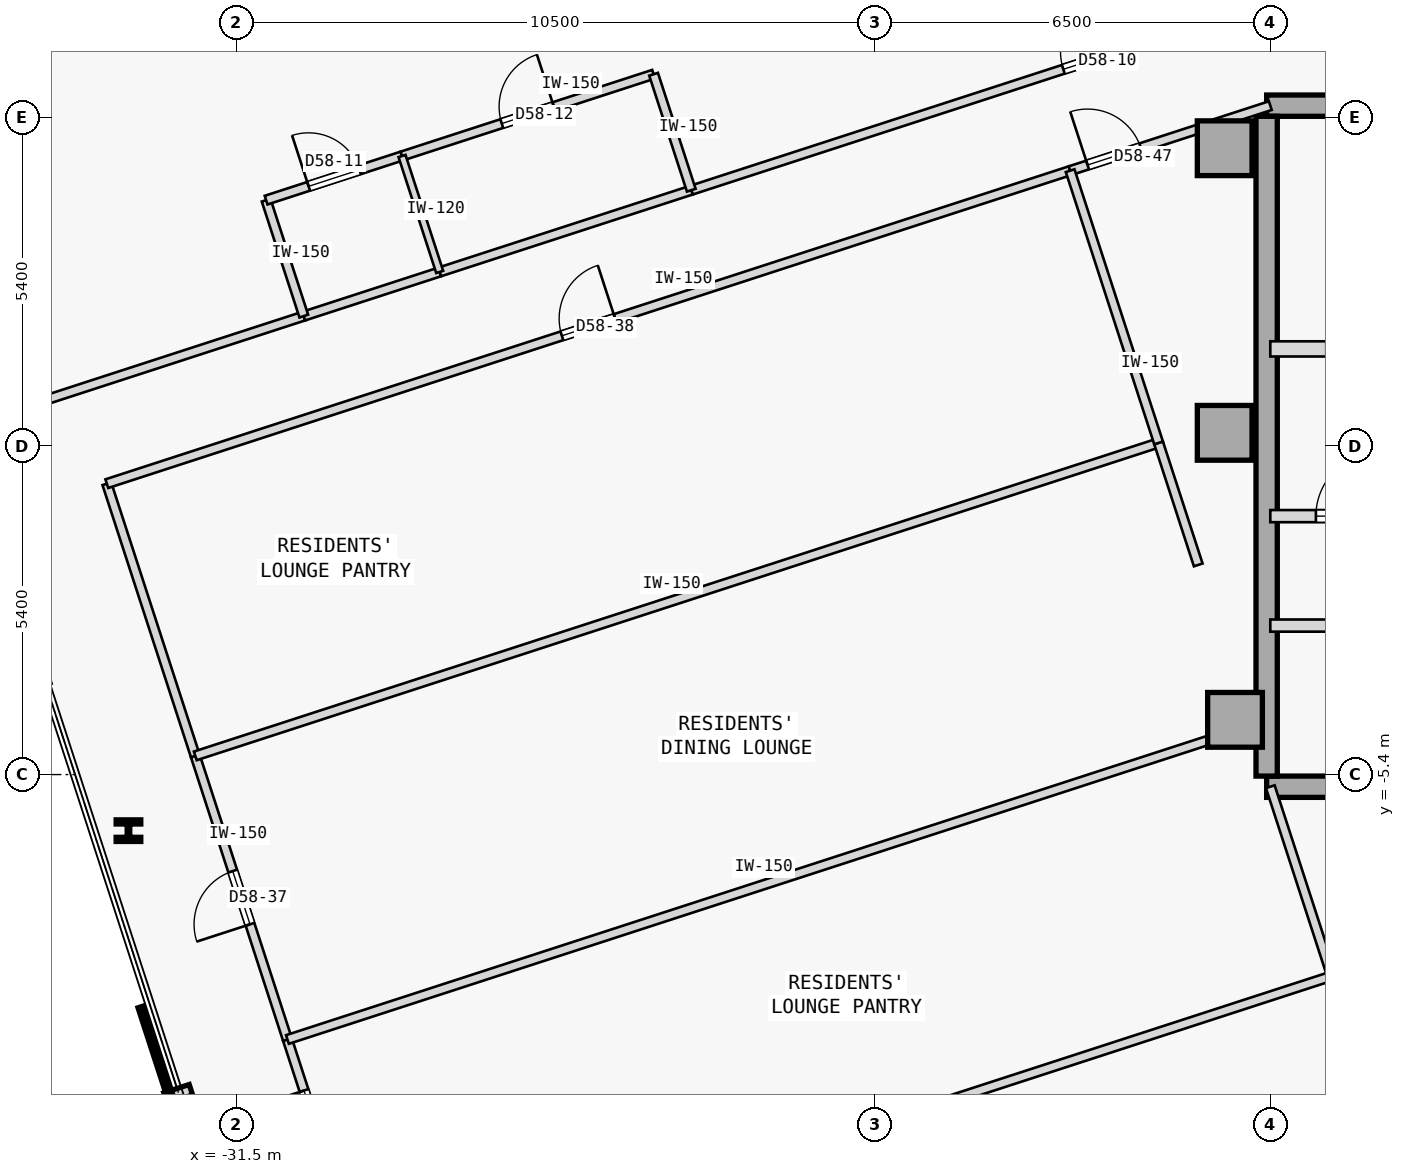
"""IFC4 building model, lengths in metres.
Left out: names, types, materials, properties, quantities, classifications, styles, units other than length and angle.
Written with IfcOpenShell. Run it as: python <this file> out.ifc"""

import sys

from ifc_helpers import new_model, si_unit, direction, frame, frame_2d, origin, origin_2d, place, context, subcontext, project, spatial, rectangle, i_section, extrude, element, fill, save


model = new_model("IFC4")
c1 = context("Model", 3, precision=1e-05, world=origin(), true_north=direction((0.0, 1.0)))
c2 = subcontext(c1, "Body", "Model", "MODEL_VIEW")
j1 = project(units=[si_unit("LENGTHUNIT", "METRE"), si_unit("PLANEANGLEUNIT", "RADIAN")], contexts=[c1])
p1 = place(None, origin())
s1 = spatial("IfcSite", under=j1, at=p1, CompositionType="ELEMENT")
p2 = place(p1, origin())
s2 = spatial("IfcBuilding", under=s1, at=p2, CompositionType="ELEMENT")
p3 = place(p2, frame((0.0, 0.0, 220.95)))
s3 = spatial("IfcBuildingStorey", under=s2, at=p3, CompositionType="ELEMENT", Elevation=220.95)
for number, where, z_axis, x_axis in (
    (1, (-15.25, 4.9, 0.0), (0.0, 0.0, 1.0), (1.0, 0.0, 0.0)),
    (2, (-15.25, 0.22, 0.0), (0.0, 0.0, 1.0), (1.0, 0.0, 0.0)),
    (3, (-15.08, -4.5, 0.0), (0.0, 0.0, 1.0), (1.0, 0.0, 0.0)),
):
    element("IfcColumn", number, at=place(p3, frame(where, z_axis=z_axis, x_axis=x_axis)), inside=s3, PredefinedType="COLUMN", context=c2, shape_type="SweptSolid", body=[
        extrude(rectangle(XDim=0.9, YDim=0.9, at=origin_2d()), origin(), (0.0, 0.0, 1.0), 3.35),
    ])
p4 = place(p3, frame((-14.56, 5.6, 0.0), z_axis=(0.0, 0.0, 1.0), x_axis=(1.0, 0.0, 0.0)))
e4 = element("IfcWall", 4, at=p4, inside=s3, PredefinedType="SHEAR", context=c2, shape_type="SweptSolid", body=[
    extrude(rectangle(XDim=11.41, YDim=0.35, at=frame_2d((5.705, 0.0))), origin(), (0.0, 0.0, 1.0), 3.125),
])
p5 = place(p3, frame((-14.56, -5.6, 0.0), z_axis=(0.0, 0.0, 1.0), x_axis=(1.0, 0.0, 0.0)))
e5 = element("IfcWall", 5, at=p5, inside=s3, PredefinedType="SHEAR", context=c2, shape_type="SweptSolid", body=[
    extrude(rectangle(XDim=10.86, YDim=0.35, at=frame_2d((5.43, 0.0))), origin(), (0.0, 0.0, 1.0), 3.125),
])
p6 = place(p3, frame((-14.56, -5.425, 0.0), z_axis=(0.0, 0.0, 1.0), x_axis=(0.0, 1.0, 0.0)))
e6 = element("IfcWall", 6, at=p6, inside=s3, PredefinedType="SHEAR", context=c2, shape_type="SweptSolid", body=[
    extrude(rectangle(XDim=10.85, YDim=0.35, at=frame_2d((5.425, 0.0))), origin(), (0.0, 0.0, 1.0), 3.125),
])
p7 = place(p3, frame((-33.278, -6.322, 0.0), z_axis=(0.0, 0.0, 1.0), x_axis=(1.0, 0.0, 0.0)))
e7 = element("IfcColumn", 7, at=p7, inside=s3, PredefinedType="COLUMN", context=c2, shape_type="SweptSolid", body=[
    extrude(i_section(OverallWidth=0.405, OverallDepth=0.355, WebThickness=0.042, FlangeThickness=0.068, FilletRadius=0.015, at=origin_2d()), origin(), (0.0, 0.0, 1.0), 3.35),
])
p8 = place(p3, frame((-14.5, 1.6, 0.0), z_axis=(0.0, 0.0, 1.0), x_axis=(1.0, 0.0, 0.0)))
e8 = element("IfcWall", 8, at=p8, inside=s3, PredefinedType="STANDARD", context=c2, shape_type="SweptSolid", body=[
    extrude(rectangle(XDim=3.6, YDim=0.25, at=frame_2d((1.8, 0.0))), origin(), (0.0, 0.0, 1.0), 3.125),
])
p9 = place(p8, frame((0.92, 0.0, 0.0)))
e9 = element("IfcOpeningElement", 9, at=p9, cuts=e8, PredefinedType="OPENING", context=c2, shape_type="SweptSolid", body=[
    extrude(rectangle(XDim=1.05, YDim=2.15, at=frame_2d((0.525, 1.075))), frame((0.0, 0.135, 0.0), z_axis=(0.0, -1.0, 0.0), x_axis=(1.0, 0.0, 0.0)), (0.0, 0.0, 1.0), 0.27),
])
p10 = place(p3, frame((-14.5, -1.15, 0.0), z_axis=(0.0, 0.0, 1.0), x_axis=(1.0, 0.0, 0.0)))
e10 = element("IfcWall", 10, at=p10, inside=s3, PredefinedType="STANDARD", context=c2, shape_type="SweptSolid", body=[
    extrude(rectangle(XDim=2.95, YDim=0.2, at=frame_2d((1.475, 0.0))), origin(), (0.0, 0.0, 1.0), 3.125),
])
p11 = place(p10, frame((0.75, 0.0, 0.0)))
e11 = element("IfcOpeningElement", 11, at=p11, cuts=e10, PredefinedType="OPENING", context=c2, shape_type="SweptSolid", body=[
    extrude(rectangle(XDim=1.05, YDim=2.18, at=frame_2d((0.525, 1.09))), frame((0.0, 0.11, 0.0), z_axis=(0.0, -1.0, 0.0), x_axis=(1.0, 0.0, 0.0)), (0.0, 0.0, 1.0), 0.22),
])
p12 = place(p3, frame((-14.5, -2.95, 0.0), z_axis=(0.0, 0.0, 1.0), x_axis=(1.0, 0.0, 0.0)))
e12 = element("IfcWall", 12, at=p12, inside=s3, PredefinedType="STANDARD", context=c2, shape_type="SweptSolid", body=[
    extrude(rectangle(XDim=10.8, YDim=0.2, at=frame_2d((5.4, 0.0))), origin(), (0.0, 0.0, 1.0), 3.125),
])
p13 = place(p12, frame((9.17, 0.0, 0.0)))
e13 = element("IfcOpeningElement", 13, at=p13, cuts=e12, PredefinedType="OPENING", context=c2, shape_type="SweptSolid", body=[
    extrude(rectangle(XDim=1.1, YDim=2.15, at=frame_2d((0.55, 1.075))), frame((0.0, 0.11, 0.0), z_axis=(0.0, -1.0, 0.0), x_axis=(1.0, 0.0, 0.0)), (0.0, 0.0, 1.0), 0.22),
])
p14 = place(p12, frame((1.73, 0.0, 0.0)))
e14 = element("IfcOpeningElement", 14, at=p14, cuts=e12, PredefinedType="OPENING", context=c2, shape_type="SweptSolid", body=[
    extrude(rectangle(XDim=0.92, YDim=2.15, at=frame_2d((0.46, 1.075))), frame((0.0, 0.11, 0.0), z_axis=(0.0, -1.0, 0.0), x_axis=(1.0, 0.0, 0.0)), (0.0, 0.0, 1.0), 0.22),
])
p15 = place(p12, frame((6.05, 0.0, 0.0)))
e15 = element("IfcOpeningElement", 15, at=p15, cuts=e12, PredefinedType="OPENING", context=c2, shape_type="SweptSolid", body=[
    extrude(rectangle(XDim=0.92, YDim=2.15, at=frame_2d((0.46, 1.075))), frame((0.0, 0.11, 0.0), z_axis=(0.0, -1.0, 0.0), x_axis=(1.0, 0.0, 0.0)), (0.0, 0.0, 1.0), 0.22),
])
p16 = place(p3, frame((-36.012, 0.314, 0.0), z_axis=(0.0, 0.0, 1.0), x_axis=(0.951065348244, 0.308989811111, 0.0)))
e16 = element("IfcWall", 16, at=p16, inside=s3, PredefinedType="PARTITIONING", context=c2, shape_type="SweptSolid", body=[
    extrude(rectangle(XDim=5.907, YDim=0.15, at=frame_2d((2.954, 0.0))), origin(), (0.0, 0.0, 1.0), 3.125),
])
p17 = place(p3, frame((-24.022, 4.21, 0.0), z_axis=(0.0, 0.0, 1.0), x_axis=(0.951058997127, 0.309009359055, 0.0)))
e17 = element("IfcWall", 17, at=p17, inside=s3, PredefinedType="PARTITIONING", context=c2, shape_type="SweptSolid", body=[
    extrude(rectangle(XDim=13.817, YDim=0.15, at=frame_2d((6.908, 0.0))), origin(), (0.0, 0.0, 1.0), 3.125),
])
p18 = place(p17, frame((6.434, 0.0, 0.0)))
e18 = element("IfcOpeningElement", 18, at=p18, cuts=e17, PredefinedType="OPENING", context=c2, shape_type="SweptSolid", body=[
    extrude(rectangle(XDim=0.95, YDim=2.15, at=frame_2d((0.475, 1.075))), frame((0.0, 0.085, 0.0), z_axis=(0.0, -1.0, 0.0), x_axis=(1.0, 0.0, 0.0)), (0.0, 0.0, 1.0), 0.17),
])
p19 = place(p3, frame((-30.394, 2.139, 0.0), z_axis=(0.0, 0.0, 1.0), x_axis=(0.951045519245, 0.309050837767, 0.0)))
e19 = element("IfcWall", 19, at=p19, inside=s3, PredefinedType="PARTITIONING", context=c2, shape_type="SweptSolid", body=[
    extrude(rectangle(XDim=2.35, YDim=0.15, at=frame_2d((1.175, 0.0))), origin(), (0.0, 0.0, 1.0), 3.125),
])
p20 = place(p3, frame((-28.159, 2.866, 0.0), z_axis=(0.0, 0.0, 1.0), x_axis=(0.951052627573, 0.309028962374, 0.0)))
e20 = element("IfcWall", 20, at=p20, inside=s3, PredefinedType="PARTITIONING", context=c2, shape_type="SweptSolid", body=[
    extrude(rectangle(XDim=4.35, YDim=0.15, at=frame_2d((2.175, 0.0))), origin(), (0.0, 0.0, 1.0), 3.125),
])
p21 = place(p3, frame((-29.833, -12.311, 0.0), z_axis=(0.0, 0.0, 1.0), x_axis=(-0.309044953986, 0.951047431213, 0.0)))
e21 = element("IfcWall", 21, at=p21, inside=s3, PredefinedType="PARTITIONING", context=c2, shape_type="SweptSolid", body=[
    extrude(rectangle(XDim=2.685, YDim=0.15, at=frame_2d((1.343, 0.0))), origin(), (0.0, 0.0, 1.0), 3.125),
])
p22 = place(p21, frame((0.883, 0.0, 0.0)))
e22 = element("IfcOpeningElement", 22, at=p22, cuts=e21, PredefinedType="OPENING", context=c2, shape_type="SweptSolid", body=[
    extrude(rectangle(XDim=0.92, YDim=2.15, at=frame_2d((0.46, 1.075))), frame((0.0, 0.085, 0.0), z_axis=(0.0, -1.0, 0.0), x_axis=(1.0, 0.0, 0.0)), (0.0, 0.0, 1.0), 0.17),
])
p23 = place(p3, frame((-30.663, -9.757, 0.0), z_axis=(0.0, 0.0, 1.0), x_axis=(-0.309019653166, 0.951055652397, 0.0)))
e23 = element("IfcWall", 23, at=p23, inside=s3, PredefinedType="PARTITIONING", context=c2, shape_type="SweptSolid", body=[
    extrude(rectangle(XDim=4.904, YDim=0.15, at=frame_2d((2.452, 0.0))), origin(), (0.0, 0.0, 1.0), 3.125),
])
p24 = place(p23, frame((1.992, 0.0, 0.0)))
e24 = element("IfcOpeningElement", 24, at=p24, cuts=e23, PredefinedType="OPENING", context=c2, shape_type="SweptSolid", body=[
    extrude(rectangle(XDim=0.92, YDim=2.15, at=frame_2d((0.46, 1.075))), frame((0.0, 0.085, 0.0), z_axis=(0.0, -1.0, 0.0), x_axis=(1.0, 0.0, 0.0)), (0.0, 0.0, 1.0), 0.17),
])
p25 = place(p3, frame((-32.179, -5.093, 0.0), z_axis=(0.0, 0.0, 1.0), x_axis=(-0.309014532869, 0.951057316083, 0.0)))
e25 = element("IfcWall", 25, at=p25, inside=s3, PredefinedType="PARTITIONING", context=c2, shape_type="SweptSolid", body=[
    extrude(rectangle(XDim=4.707, YDim=0.15, at=frame_2d((2.354, 0.0))), origin(), (0.0, 0.0, 1.0), 3.125),
])
p26 = place(p3, frame((-33.633, -0.616, 0.0), z_axis=(0.0, 0.0, 1.0), x_axis=(0.951058192995, 0.309011833974, 0.0)))
e26 = element("IfcWall", 26, at=p26, inside=s3, PredefinedType="PARTITIONING", context=c2, shape_type="SweptSolid", body=[
    extrude(rectangle(XDim=16.657, YDim=0.15, at=frame_2d((8.329, 0.0))), origin(), (0.0, 0.0, 1.0), 3.125),
])
p27 = place(p26, frame((7.868, 0.0, 0.0)))
e27 = element("IfcOpeningElement", 27, at=p27, cuts=e26, PredefinedType="OPENING", context=c2, shape_type="SweptSolid", body=[
    extrude(rectangle(XDim=0.92, YDim=2.15, at=frame_2d((0.46, 1.075))), frame((0.0, 0.085, 0.0), z_axis=(0.0, -1.0, 0.0), x_axis=(1.0, 0.0, 0.0)), (0.0, 0.0, 1.0), 0.17),
])
p28 = place(p3, frame((-17.792, 4.531, 0.0), z_axis=(0.0, 0.0, 1.0), x_axis=(0.951047546178, 0.309044600193, 0.0)))
e28 = element("IfcWall", 28, at=p28, inside=s3, PredefinedType="PARTITIONING", context=c2, shape_type="SweptSolid", body=[
    extrude(rectangle(XDim=3.461, YDim=0.15, at=frame_2d((1.73, 0.0))), origin(), (0.0, 0.0, 1.0), 3.125),
])
p29 = place(p28, frame((0.302, 0.0, 0.0)))
e29 = element("IfcOpeningElement", 29, at=p29, cuts=e28, PredefinedType="OPENING", context=c2, shape_type="SweptSolid", body=[
    extrude(rectangle(XDim=0.92, YDim=2.15, at=frame_2d((0.46, 1.075))), frame((0.0, 0.085, 0.0), z_axis=(0.0, -1.0, 0.0), x_axis=(1.0, 0.0, 0.0)), (0.0, 0.0, 1.0), 0.17),
])
p30 = place(p3, frame((-30.394, 2.139, 0.0), z_axis=(0.0, 0.0, 1.0), x_axis=(-0.309022749039, 0.951054646472, 0.0)))
e30 = element("IfcWall", 30, at=p30, inside=s3, PredefinedType="PARTITIONING", context=c2, shape_type="SweptSolid", body=[
    extrude(rectangle(XDim=2.005, YDim=0.15, at=frame_2d((1.002, 0.0))), origin(), (0.0, 0.0, 1.0), 3.125),
])
p31 = place(p3, frame((-31.014, 4.046, 0.0), z_axis=(0.0, 0.0, 1.0), x_axis=(0.951076048914, 0.308956872689, 0.0)))
e31 = element("IfcWall", 31, at=p31, inside=s3, PredefinedType="PARTITIONING", context=c2, shape_type="SweptSolid", body=[
    extrude(rectangle(XDim=2.35, YDim=0.15, at=frame_2d((1.175, 0.0))), origin(), (0.0, 0.0, 1.0), 3.125),
])
p32 = place(p31, frame((0.735, 0.0, 0.0)))
e32 = element("IfcOpeningElement", 32, at=p32, cuts=e31, PredefinedType="OPENING", context=c2, shape_type="SweptSolid", body=[
    extrude(rectangle(XDim=0.88, YDim=2.15, at=frame_2d((0.44, 1.075))), frame((0.0, 0.085, 0.0), z_axis=(0.0, -1.0, 0.0), x_axis=(1.0, 0.0, 0.0)), (0.0, 0.0, 1.0), 0.17),
])
p33 = place(p3, frame((-28.779, 4.772, 0.0), z_axis=(0.0, 0.0, 1.0), x_axis=(0.951052627573, 0.309028962374, 0.0)))
e33 = element("IfcWall", 33, at=p33, inside=s3, PredefinedType="PARTITIONING", context=c2, shape_type="SweptSolid", body=[
    extrude(rectangle(XDim=4.35, YDim=0.15, at=frame_2d((2.175, 0.0))), origin(), (0.0, 0.0, 1.0), 3.125),
])
p34 = place(p33, frame((1.725, 0.0, 0.0)))
e34 = element("IfcOpeningElement", 34, at=p34, cuts=e33, PredefinedType="OPENING", context=c2, shape_type="SweptSolid", body=[
    extrude(rectangle(XDim=0.9, YDim=2.15, at=frame_2d((0.45, 1.075))), frame((0.0, 0.085, 0.0), z_axis=(0.0, -1.0, 0.0), x_axis=(1.0, 0.0, 0.0)), (0.0, 0.0, 1.0), 0.17),
])
p35 = place(p3, frame((-24.022, 4.21, 0.0), z_axis=(0.0, 0.0, 1.0), x_axis=(-0.309058537449, 0.951043017129, 0.0)))
e35 = element("IfcWall", 35, at=p35, inside=s3, PredefinedType="PARTITIONING", context=c2, shape_type="SweptSolid", body=[
    extrude(rectangle(XDim=2.005, YDim=0.15, at=frame_2d((1.002, 0.0))), origin(), (0.0, 0.0, 1.0), 3.125),
])
p36 = place(p3, frame((-28.159, 2.866, 0.0), z_axis=(0.0, 0.0, 1.0), x_axis=(-0.309058537449, 0.951043017129, 0.0)))
e36 = element("IfcWall", 36, at=p36, inside=s3, PredefinedType="PARTITIONING", context=c2, shape_type="SweptSolid", body=[
    extrude(rectangle(XDim=2.005, YDim=0.12, at=frame_2d((1.002, 0.0))), origin(), (0.0, 0.0, 1.0), 3.125),
])
p37 = place(p3, frame((-31.208, -14.471, 0.0), z_axis=(0.0, 0.0, 1.0), x_axis=(0.951057753948, 0.309013185244, 0.0)))
e37 = element("IfcWall", 37, at=p37, inside=s3, PredefinedType="PARTITIONING", context=c2, shape_type="SweptSolid", body=[
    extrude(rectangle(XDim=18.632, YDim=0.15, at=frame_2d((9.316, 0.0))), origin(), (0.0, 0.0, 1.0), 3.125),
])
p38 = place(p3, frame((-30.663, -9.757, 0.0), z_axis=(0.0, 0.0, 1.0), x_axis=(0.951058192995, 0.309011833974, 0.0)))
e38 = element("IfcWall", 38, at=p38, inside=s3, PredefinedType="PARTITIONING", context=c2, shape_type="SweptSolid", body=[
    extrude(rectangle(XDim=16.657, YDim=0.15, at=frame_2d((8.329, 0.0))), origin(), (0.0, 0.0, 1.0), 3.125),
])
p39 = place(p3, frame((-13.488, -8.713, 0.0), z_axis=(0.0, 0.0, 1.0), x_axis=(-0.309082700143, 0.951035164687, 0.0)))
e39 = element("IfcWall", 39, at=p39, inside=s3, PredefinedType="PARTITIONING", context=c2, shape_type="SweptSolid", body=[
    extrude(rectangle(XDim=3.274, YDim=0.15, at=frame_2d((1.637, 0.0))), origin(), (0.0, 0.0, 1.0), 3.125),
])
p40 = place(p3, frame((-32.179, -5.093, 0.0), z_axis=(0.0, 0.0, 1.0), x_axis=(0.951053885426, 0.309025091239, 0.0)))
e40 = element("IfcWall", 40, at=p40, inside=s3, PredefinedType="PARTITIONING", context=c2, shape_type="SweptSolid", body=[
    extrude(rectangle(XDim=16.657, YDim=0.15, at=frame_2d((8.329, 0.0))), origin(), (0.0, 0.0, 1.0), 3.125),
])
p41 = place(p3, frame((-15.685, -1.952, 0.0), z_axis=(0.0, 0.0, 1.0), x_axis=(-0.308929092959, 0.951085072706, 0.0)))
e41 = element("IfcWall", 41, at=p41, inside=s3, PredefinedType="PARTITIONING", context=c2, shape_type="SweptSolid", body=[
    extrude(rectangle(XDim=2.11, YDim=0.15, at=frame_2d((1.055, 0.0))), origin(), (0.0, 0.0, 1.0), 3.125),
])
p42 = place(p3, frame((-16.337, 0.054, 0.0), z_axis=(0.0, 0.0, 1.0), x_axis=(-0.309029776355, 0.951052363083, 0.0)))
e42 = element("IfcWall", 42, at=p42, inside=s3, PredefinedType="PARTITIONING", context=c2, shape_type="SweptSolid", body=[
    extrude(rectangle(XDim=4.707, YDim=0.15, at=frame_2d((2.354, 0.0))), origin(), (0.0, 0.0, 1.0), 3.125),
])
p43 = place(p11, origin())
e43 = element("IfcDoor", 43, at=p43, inside=s3, OperationType="SINGLE_SWING_RIGHT", PredefinedType="DOOR", context=c2, shape_type="SweptSolid", body=[
    extrude(rectangle(XDim=1.05, YDim=2.18, at=frame_2d((0.525, 1.09))), frame((0.0, 0.025, 0.0), z_axis=(0.0, -1.0, 0.0), x_axis=(1.0, 0.0, 0.0)), (0.0, 0.0, 1.0), 0.05),
])
fill(e11, e43)
p44 = place(p18, origin())
e44 = element("IfcDoor", 44, at=p44, inside=s3, OperationType="SINGLE_SWING_RIGHT", PredefinedType="DOOR", context=c2, shape_type="SweptSolid", body=[
    extrude(rectangle(XDim=0.95, YDim=2.15, at=frame_2d((0.475, 1.075))), frame((0.0, 0.025, 0.0), z_axis=(0.0, -1.0, 0.0), x_axis=(1.0, 0.0, 0.0)), (0.0, 0.0, 1.0), 0.05),
])
fill(e18, e44)
p45 = place(p32, origin())
e45 = element("IfcDoor", 45, at=p45, inside=s3, OperationType="SINGLE_SWING_LEFT", PredefinedType="DOOR", context=c2, shape_type="SweptSolid", body=[
    extrude(rectangle(XDim=0.88, YDim=2.15, at=frame_2d((0.44, 1.075))), frame((0.0, 0.025, 0.0), z_axis=(0.0, -1.0, 0.0), x_axis=(1.0, 0.0, 0.0)), (0.0, 0.0, 1.0), 0.05),
])
fill(e32, e45)
p46 = place(p34, origin())
e46 = element("IfcDoor", 46, at=p46, inside=s3, OperationType="SINGLE_SWING_RIGHT", PredefinedType="DOOR", context=c2, shape_type="SweptSolid", body=[
    extrude(rectangle(XDim=0.9, YDim=2.15, at=frame_2d((0.45, 1.075))), frame((0.0, 0.025, 0.0), z_axis=(0.0, -1.0, 0.0), x_axis=(1.0, 0.0, 0.0)), (0.0, 0.0, 1.0), 0.05),
])
fill(e34, e46)
p47 = place(p22, origin())
e47 = element("IfcDoor", 47, at=p47, inside=s3, OperationType="SINGLE_SWING_RIGHT", PredefinedType="DOOR", context=c2, shape_type="SweptSolid", body=[
    extrude(rectangle(XDim=0.92, YDim=2.15, at=frame_2d((0.46, 1.075))), frame((0.0, 0.025, 0.0), z_axis=(0.0, -1.0, 0.0), x_axis=(1.0, 0.0, 0.0)), (0.0, 0.0, 1.0), 0.05),
])
fill(e22, e47)
p48 = place(p24, origin())
e48 = element("IfcDoor", 48, at=p48, inside=s3, OperationType="SINGLE_SWING_LEFT", PredefinedType="DOOR", context=c2, shape_type="SweptSolid", body=[
    extrude(rectangle(XDim=0.92, YDim=2.15, at=frame_2d((0.46, 1.075))), frame((0.0, 0.025, 0.0), z_axis=(0.0, -1.0, 0.0), x_axis=(1.0, 0.0, 0.0)), (0.0, 0.0, 1.0), 0.05),
])
fill(e24, e48)
p49 = place(p27, origin())
e49 = element("IfcDoor", 49, at=p49, inside=s3, OperationType="SINGLE_SWING_RIGHT", PredefinedType="DOOR", context=c2, shape_type="SweptSolid", body=[
    extrude(rectangle(XDim=0.92, YDim=2.15, at=frame_2d((0.46, 1.075))), frame((0.0, 0.025, 0.0), z_axis=(0.0, -1.0, 0.0), x_axis=(1.0, 0.0, 0.0)), (0.0, 0.0, 1.0), 0.05),
])
fill(e27, e49)
p50 = place(p29, origin())
e50 = element("IfcDoor", 50, at=p50, inside=s3, OperationType="SINGLE_SWING_LEFT", PredefinedType="DOOR", context=c2, shape_type="SweptSolid", body=[
    extrude(rectangle(XDim=0.92, YDim=2.15, at=frame_2d((0.46, 1.075))), frame((0.0, 0.025, 0.0), z_axis=(0.0, -1.0, 0.0), x_axis=(1.0, 0.0, 0.0)), (0.0, 0.0, 1.0), 0.05),
])
fill(e29, e50)
save(model, sys.argv[1])
